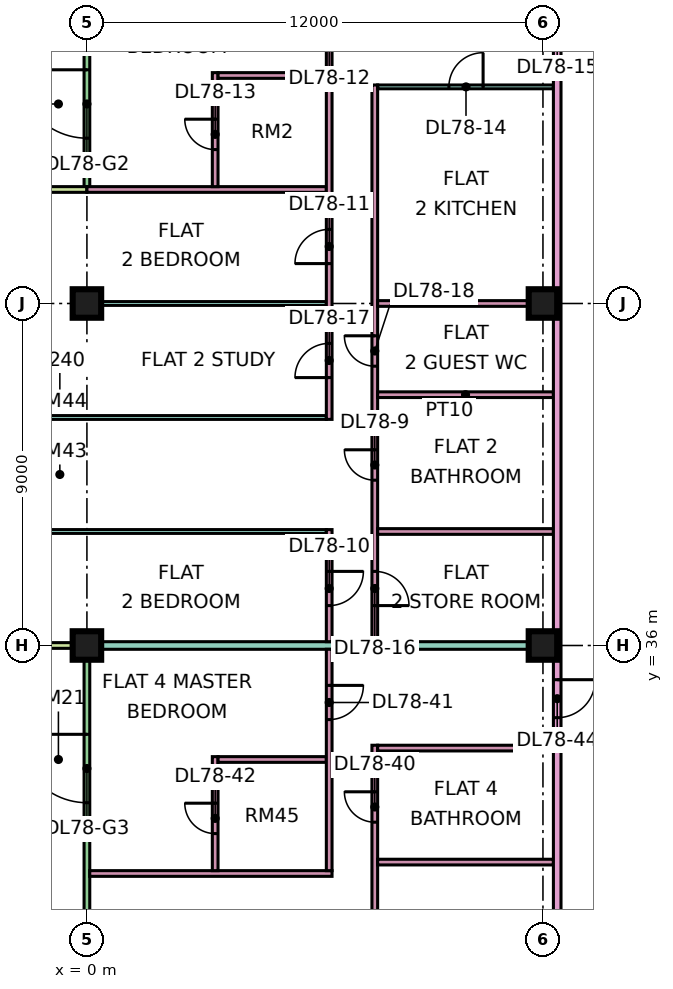
"""IFC4 building model, lengths in metres.
Left out: names, types, materials, properties, quantities, classifications, styles, units other than length and angle.
Written with IfcOpenShell. Run it as: python <this file> out.ifc"""

import sys

from ifc_helpers import new_model, si_unit, direction, frame, frame_2d, origin, origin_2d, place, context, subcontext, project, spatial, rectangle, extrude, element, fill, save


model = new_model("IFC4")
c1 = context("Model", 3, precision=1e-05, world=origin(), true_north=direction((0.0, 1.0)))
c2 = subcontext(c1, "Body", "Model", "MODEL_VIEW")
j1 = project(units=[si_unit("LENGTHUNIT", "METRE"), si_unit("PLANEANGLEUNIT", "RADIAN")], contexts=[c1])
p1 = place(None, origin())
s1 = spatial("IfcSite", under=j1, at=p1, CompositionType="ELEMENT")
p2 = place(p1, origin())
s2 = spatial("IfcBuilding", under=s1, at=p2, CompositionType="ELEMENT")
p3 = place(p2, frame((0.0, 0.0, 338.9)))
s3 = spatial("IfcBuildingStorey", under=s2, at=p3, CompositionType="ELEMENT", Elevation=338.9)
p4 = place(p3, frame((0.0, 36.0, 0.0), z_axis=(0.0, 0.0, 1.0), x_axis=(1.0, 0.0, 0.0)))
e1 = element("IfcColumn", 1, at=p4, inside=s3, PredefinedType="COLUMN", context=c2, shape_type="SweptSolid", body=[
    extrude(rectangle(XDim=0.75, YDim=0.75, at=origin_2d()), origin(), (0.0, 0.0, 1.0), 3.75),
])
p5 = place(p3, frame((0.0, 45.0, 0.0), z_axis=(0.0, 0.0, 1.0), x_axis=(1.0, 0.0, 0.0)))
e2 = element("IfcColumn", 2, at=p5, inside=s3, PredefinedType="COLUMN", context=c2, shape_type="SweptSolid", body=[
    extrude(rectangle(XDim=0.75, YDim=0.75, at=origin_2d()), origin(), (0.0, 0.0, 1.0), 3.75),
])
for number, where, z_axis, x_axis in (
    (3, (12.0, 36.0, 0.0), (0.0, 0.0, 1.0), (1.0, 0.0, 0.0)),
    (4, (12.0, 45.0, 0.0), (0.0, 0.0, 1.0), (1.0, 0.0, 0.0)),
):
    element("IfcColumn", number, at=place(p3, frame(where, z_axis=z_axis, x_axis=x_axis)), inside=s3, PredefinedType="COLUMN", context=c2, shape_type="SweptSolid", body=[
        extrude(rectangle(XDim=0.75, YDim=0.75, at=origin_2d()), origin(), (0.0, 0.0, 1.0), 3.75),
    ])
p6 = place(p3, frame((0.0, 52.425, 0.0), z_axis=(0.0, 0.0, 1.0), x_axis=(0.0, -1.0, 0.0)))
e5 = element("IfcWall", 5, at=p6, inside=s3, PredefinedType="SOLIDWALL", context=c2, shape_type="SweptSolid", body=[
    extrude(rectangle(XDim=4.35, YDim=0.15, at=frame_2d((2.175, 0.0))), origin(), (0.0, 0.0, 1.0), 3.35),
])
p7 = place(p6, frame((1.275, 0.0, 0.0)))
e6 = element("IfcOpeningElement", 6, at=p7, cuts=e5, PredefinedType="OPENING", context=c2, shape_type="SweptSolid", body=[
    extrude(rectangle(XDim=1.8, YDim=2.4, at=frame_2d((0.9, 1.2))), frame((0.0, 0.085, 0.0), z_axis=(0.0, -1.0, 0.0), x_axis=(1.0, 0.0, 0.0)), (0.0, 0.0, 1.0), 0.17),
])
p8 = place(p3, frame((-1.5, 48.0, 0.0), z_axis=(0.0, 0.0, 1.0), x_axis=(1.0, 0.0, 0.0)))
e7 = element("IfcWall", 7, at=p8, inside=s3, PredefinedType="SOLIDWALL", context=c2, shape_type="SweptSolid", body=[
    extrude(rectangle(XDim=1.5, YDim=0.15, at=frame_2d((0.75, 0.0))), origin(), (0.0, 0.0, 1.0), 3.35),
])
p9 = place(p3, frame((0.0, 35.925, 0.0), z_axis=(0.0, 0.0, 1.0), x_axis=(0.0, -1.0, 0.0)))
e8 = element("IfcWall", 8, at=p9, inside=s3, PredefinedType="SOLIDWALL", context=c2, shape_type="SweptSolid", body=[
    extrude(rectangle(XDim=11.85, YDim=0.15, at=frame_2d((5.925, 0.0))), origin(), (0.0, 0.0, 1.0), 3.35),
])
p10 = place(p9, frame((2.262, 0.0, 0.0)))
e9 = element("IfcOpeningElement", 9, at=p10, cuts=e8, PredefinedType="OPENING", context=c2, shape_type="SweptSolid", body=[
    extrude(rectangle(XDim=1.8, YDim=2.4, at=frame_2d((0.9, 1.2))), frame((0.0, 0.085, 0.0), z_axis=(0.0, -1.0, 0.0), x_axis=(1.0, 0.0, 0.0)), (0.0, 0.0, 1.0), 0.17),
])
p11 = place(p9, frame((7.188, 0.0, 0.45)))
e10 = element("IfcOpeningElement", 10, at=p11, cuts=e8, PredefinedType="OPENING", context=c2, shape_type="SweptSolid", body=[
    extrude(rectangle(XDim=3.0, YDim=2.4, at=frame_2d((1.5, 1.2))), frame((0.0, 0.085, 0.0), z_axis=(0.0, -1.0, 0.0), x_axis=(1.0, 0.0, 0.0)), (0.0, 0.0, 1.0), 0.17),
])
p12 = place(p3, frame((-1.5, 36.0, 0.0), z_axis=(0.0, 0.0, 1.0), x_axis=(1.0, 0.0, 0.0)))
e11 = element("IfcWall", 11, at=p12, inside=s3, PredefinedType="SOLIDWALL", context=c2, shape_type="SweptSolid", body=[
    extrude(rectangle(XDim=1.5, YDim=0.15, at=frame_2d((0.75, 0.0))), origin(), (0.0, 0.0, 1.0), 3.35),
])
e12 = element("IfcWall", 12, at=p4, inside=s3, PredefinedType="PARTITIONING", context=c2, shape_type="SweptSolid", body=[
    extrude(rectangle(XDim=12.275, YDim=0.2, at=frame_2d((6.137, 0.0))), origin(), (0.0, 0.0, 1.0), 3.35),
])
for number, where, z_axis, x_axis in (
    (13, (-1.35, 39.0, 0.0), (0.0, 0.0, 1.0), (1.0, 0.0, 0.0)),
    (14, (-1.35, 42.0, 0.0), (0.0, 0.0, 1.0), (1.0, 0.0, 0.0)),
):
    element("IfcWall", number, at=place(p3, frame(where, z_axis=z_axis, x_axis=x_axis)), inside=s3, PredefinedType="PARTITIONING", context=c2, shape_type="SweptSolid", body=[
        extrude(rectangle(XDim=7.65, YDim=0.1, at=frame_2d((3.825, 0.0))), origin(), (0.0, 0.0, 1.0), 3.35),
    ])
e15 = element("IfcWall", 15, at=p5, inside=s3, PredefinedType="PARTITIONING", context=c2, shape_type="SweptSolid", body=[
    extrude(rectangle(XDim=6.3, YDim=0.1, at=frame_2d((3.15, 0.0))), origin(), (0.0, 0.0, 1.0), 3.35),
])
p13 = place(p3, frame((0.0, 48.0, 0.0), z_axis=(0.0, 0.0, 1.0), x_axis=(1.0, 0.0, 0.0)))
e16 = element("IfcWall", 16, at=p13, inside=s3, PredefinedType="PARTITIONING", context=c2, shape_type="SweptSolid", body=[
    extrude(rectangle(XDim=6.3, YDim=0.15, at=frame_2d((3.15, 0.0))), origin(), (0.0, 0.0, 1.0), 3.35),
])
p14 = place(p3, frame((0.074, 30.0, 0.0), z_axis=(0.0, 0.0, 1.0), x_axis=(1.0, 0.0, 0.0)))
e17 = element("IfcWall", 17, at=p14, inside=s3, PredefinedType="PARTITIONING", context=c2, shape_type="SweptSolid", body=[
    extrude(rectangle(XDim=6.376, YDim=0.15, at=frame_2d((3.188, 0.0))), origin(), (0.0, 0.0, 1.0), 3.35),
])
p15 = place(p3, frame((3.375, 30.075, 0.0), z_axis=(0.0, 0.0, 1.0), x_axis=(0.0, 1.0, 0.0)))
e18 = element("IfcWall", 18, at=p15, inside=s3, PredefinedType="PARTITIONING", context=c2, shape_type="SweptSolid", body=[
    extrude(rectangle(XDim=3.0, YDim=0.15, at=frame_2d((1.5, 0.0))), origin(), (0.0, 0.0, 1.0), 3.35),
])
p16 = place(p15, frame((0.975, 0.0, 0.0)))
e19 = element("IfcOpeningElement", 19, at=p16, cuts=e18, PredefinedType="OPENING", context=c2, shape_type="SweptSolid", body=[
    extrude(rectangle(XDim=0.8, YDim=2.1, at=frame_2d((0.4, 1.05))), frame((0.0, 0.085, 0.0), z_axis=(0.0, -1.0, 0.0), x_axis=(1.0, 0.0, 0.0)), (0.0, 0.0, 1.0), 0.17),
])
p17 = place(p3, frame((3.375, 48.075, 0.0), z_axis=(0.0, 0.0, 1.0), x_axis=(0.0, 1.0, 0.0)))
e20 = element("IfcWall", 20, at=p17, inside=s3, PredefinedType="PARTITIONING", context=c2, shape_type="SweptSolid", body=[
    extrude(rectangle(XDim=3.0, YDim=0.15, at=frame_2d((1.5, 0.0))), origin(), (0.0, 0.0, 1.0), 3.35),
])
p18 = place(p17, frame((0.975, 0.0, 0.0)))
e21 = element("IfcOpeningElement", 21, at=p18, cuts=e20, PredefinedType="OPENING", context=c2, shape_type="SweptSolid", body=[
    extrude(rectangle(XDim=0.8, YDim=2.1, at=frame_2d((0.4, 1.05))), frame((0.0, 0.085, 0.0), z_axis=(0.0, -1.0, 0.0), x_axis=(1.0, 0.0, 0.0)), (0.0, 0.0, 1.0), 0.17),
])
for number, where, z_axis, x_axis in (
    (22, (3.45, 33.0, 0.0), (0.0, 0.0, 1.0), (1.0, 0.0, 0.0)),
    (23, (3.45, 51.0, 0.0), (0.0, 0.0, 1.0), (1.0, 0.0, 0.0)),
):
    element("IfcWall", number, at=place(p3, frame(where, z_axis=z_axis, x_axis=x_axis)), inside=s3, PredefinedType="PARTITIONING", context=c2, shape_type="SweptSolid", body=[
        extrude(rectangle(XDim=2.85, YDim=0.15, at=frame_2d((1.425, 0.0))), origin(), (0.0, 0.0, 1.0), 3.35),
    ])
p19 = place(p3, frame((6.375, 30.075, 0.0), z_axis=(0.0, 0.0, 1.0), x_axis=(0.0, 1.0, 0.0)))
e24 = element("IfcWall", 24, at=p19, inside=s3, PredefinedType="PARTITIONING", context=c2, shape_type="SweptSolid", body=[
    extrude(rectangle(XDim=5.825, YDim=0.15, at=frame_2d((2.913, 0.0))), origin(), (0.0, 0.0, 1.0), 3.35),
])
p20 = place(p19, frame((3.975, 0.0, 0.0)))
e25 = element("IfcOpeningElement", 25, at=p20, cuts=e24, PredefinedType="OPENING", context=c2, shape_type="SweptSolid", body=[
    extrude(rectangle(XDim=0.9, YDim=2.1, at=frame_2d((0.45, 1.05))), frame((0.0, 0.085, 0.0), z_axis=(0.0, -1.0, 0.0), x_axis=(1.0, 0.0, 0.0)), (0.0, 0.0, 1.0), 0.17),
])
p21 = place(p3, frame((6.375, 36.1, 0.0), z_axis=(0.0, 0.0, 1.0), x_axis=(0.0, 1.0, 0.0)))
e26 = element("IfcWall", 26, at=p21, inside=s3, PredefinedType="PARTITIONING", context=c2, shape_type="SweptSolid", body=[
    extrude(rectangle(XDim=2.95, YDim=0.15, at=frame_2d((1.475, 0.0))), origin(), (0.0, 0.0, 1.0), 3.35),
])
p22 = place(p21, frame((0.95, 0.0, 0.0)))
e27 = element("IfcOpeningElement", 27, at=p22, cuts=e26, PredefinedType="OPENING", context=c2, shape_type="SweptSolid", body=[
    extrude(rectangle(XDim=0.9, YDim=2.1, at=frame_2d((0.45, 1.05))), frame((0.0, 0.085, 0.0), z_axis=(0.0, -1.0, 0.0), x_axis=(1.0, 0.0, 0.0)), (0.0, 0.0, 1.0), 0.17),
])
p23 = place(p3, frame((6.375, 41.95, 0.0), z_axis=(0.0, 0.0, 1.0), x_axis=(0.0, 1.0, 0.0)))
e28 = element("IfcWall", 28, at=p23, inside=s3, PredefinedType="PARTITIONING", context=c2, shape_type="SweptSolid", body=[
    extrude(rectangle(XDim=11.976, YDim=0.15, at=frame_2d((5.988, 0.0))), origin(), (0.0, 0.0, 1.0), 3.35),
])
p24 = place(p23, frame((4.1, 0.0, 0.0)))
e29 = element("IfcOpeningElement", 29, at=p24, cuts=e28, PredefinedType="OPENING", context=c2, shape_type="SweptSolid", body=[
    extrude(rectangle(XDim=0.9, YDim=2.1, at=frame_2d((0.45, 1.05))), frame((0.0, 0.085, 0.0), z_axis=(0.0, -1.0, 0.0), x_axis=(1.0, 0.0, 0.0)), (0.0, 0.0, 1.0), 0.17),
])
p25 = place(p23, frame((10.1, 0.0, 0.0)))
e30 = element("IfcOpeningElement", 30, at=p25, cuts=e28, PredefinedType="OPENING", context=c2, shape_type="SweptSolid", body=[
    extrude(rectangle(XDim=0.9, YDim=2.1, at=frame_2d((0.45, 1.05))), frame((0.0, 0.085, 0.0), z_axis=(0.0, -1.0, 0.0), x_axis=(1.0, 0.0, 0.0)), (0.0, 0.0, 1.0), 0.17),
])
p26 = place(p23, frame((1.1, 0.0, 0.0)))
e31 = element("IfcOpeningElement", 31, at=p26, cuts=e28, PredefinedType="OPENING", context=c2, shape_type="SweptSolid", body=[
    extrude(rectangle(XDim=0.9, YDim=2.1, at=frame_2d((0.45, 1.05))), frame((0.0, 0.085, 0.0), z_axis=(0.0, -1.0, 0.0), x_axis=(1.0, 0.0, 0.0)), (0.0, 0.0, 1.0), 0.17),
])
p27 = place(p3, frame((7.575, 22.5, 0.0), z_axis=(0.0, 0.0, 1.0), x_axis=(0.0, 1.0, 0.0)))
e32 = element("IfcWall", 32, at=p27, inside=s3, PredefinedType="PARTITIONING", context=c2, shape_type="SweptSolid", body=[
    extrude(rectangle(XDim=10.875, YDim=0.15, at=frame_2d((5.438, 0.0))), origin(), (0.0, 0.0, 1.0), 3.35),
])
p28 = place(p27, frame((8.85, 0.0, 0.0)))
e33 = element("IfcOpeningElement", 33, at=p28, cuts=e32, PredefinedType="OPENING", context=c2, shape_type="SweptSolid", body=[
    extrude(rectangle(XDim=0.8, YDim=2.1, at=frame_2d((0.4, 1.05))), frame((0.0, 0.085, 0.0), z_axis=(0.0, -1.0, 0.0), x_axis=(1.0, 0.0, 0.0)), (0.0, 0.0, 1.0), 0.17),
])
p29 = place(p27, frame((3.35, 0.0, 0.0)))
e34 = element("IfcOpeningElement", 34, at=p29, cuts=e32, PredefinedType="OPENING", context=c2, shape_type="SweptSolid", body=[
    extrude(rectangle(XDim=0.9, YDim=2.1, at=frame_2d((0.45, 1.05))), frame((0.0, 0.085, 0.0), z_axis=(0.0, -1.0, 0.0), x_axis=(1.0, 0.0, 0.0)), (0.0, 0.0, 1.0), 0.17),
])
p30 = place(p3, frame((7.575, 36.1, 0.0), z_axis=(0.0, 0.0, 1.0), x_axis=(0.0, 1.0, 0.0)))
e35 = element("IfcWall", 35, at=p30, inside=s3, PredefinedType="PARTITIONING", context=c2, shape_type="SweptSolid", body=[
    extrude(rectangle(XDim=14.65, YDim=0.15, at=frame_2d((7.325, 0.0))), origin(), (0.0, 0.0, 1.0), 3.35),
])
p31 = place(p30, frame((4.25, 0.0, 0.0)))
e36 = element("IfcOpeningElement", 36, at=p31, cuts=e35, PredefinedType="OPENING", context=c2, shape_type="SweptSolid", body=[
    extrude(rectangle(XDim=0.8, YDim=2.1, at=frame_2d((0.4, 1.05))), frame((0.0, 0.085, 0.0), z_axis=(0.0, -1.0, 0.0), x_axis=(1.0, 0.0, 0.0)), (0.0, 0.0, 1.0), 0.17),
])
p32 = place(p30, frame((0.95, 0.0, 0.0)))
e37 = element("IfcOpeningElement", 37, at=p32, cuts=e35, PredefinedType="OPENING", context=c2, shape_type="SweptSolid", body=[
    extrude(rectangle(XDim=0.9, YDim=2.1, at=frame_2d((0.45, 1.05))), frame((0.0, 0.085, 0.0), z_axis=(0.0, -1.0, 0.0), x_axis=(1.0, 0.0, 0.0)), (0.0, 0.0, 1.0), 0.17),
])
p33 = place(p30, frame((7.25, 0.0, 0.0)))
e38 = element("IfcOpeningElement", 38, at=p33, cuts=e35, PredefinedType="OPENING", context=c2, shape_type="SweptSolid", body=[
    extrude(rectangle(XDim=0.8, YDim=2.1, at=frame_2d((0.4, 1.05))), frame((0.0, 0.085, 0.0), z_axis=(0.0, -1.0, 0.0), x_axis=(1.0, 0.0, 0.0)), (0.0, 0.0, 1.0), 0.17),
])
for number, where, z_axis, x_axis in (
    (39, (7.65, 30.3, 0.0), (0.0, 0.0, 1.0), (1.0, 0.0, 0.0)),
    (40, (7.65, 33.3, 0.0), (0.0, 0.0, 1.0), (1.0, 0.0, 0.0)),
    (41, (7.65, 39.0, 0.0), (0.0, 0.0, 1.0), (1.0, 0.0, 0.0)),
    (42, (7.65, 42.6, 0.0), (0.0, 0.0, 1.0), (1.0, 0.0, 0.0)),
    (43, (7.65, 45.0, 0.0), (0.0, 0.0, 1.0), (1.0, 0.0, 0.0)),
):
    element("IfcWall", number, at=place(p3, frame(where, z_axis=z_axis, x_axis=x_axis)), inside=s3, PredefinedType="PARTITIONING", context=c2, shape_type="SweptSolid", body=[
        extrude(rectangle(XDim=4.625, YDim=0.15, at=frame_2d((2.312, 0.0))), origin(), (0.0, 0.0, 1.0), 3.35),
    ])
p34 = place(p3, frame((7.65, 50.7, 0.0), z_axis=(0.0, 0.0, 1.0), x_axis=(1.0, 0.0, 0.0)))
e44 = element("IfcWall", 44, at=p34, inside=s3, PredefinedType="PARTITIONING", context=c2, shape_type="SweptSolid", body=[
    extrude(rectangle(XDim=4.625, YDim=0.1, at=frame_2d((2.312, 0.0))), origin(), (0.0, 0.0, 1.0), 3.35),
])
p35 = place(p34, frame((1.875, 0.0, 0.0)))
e45 = element("IfcOpeningElement", 45, at=p35, cuts=e44, PredefinedType="OPENING", context=c2, shape_type="SweptSolid", body=[
    extrude(rectangle(XDim=0.9, YDim=2.1, at=frame_2d((0.45, 1.05))), frame((0.0, 0.06, 0.0), z_axis=(0.0, -1.0, 0.0), x_axis=(1.0, 0.0, 0.0)), (0.0, 0.0, 1.0), 0.12),
])
p36 = place(p3, frame((12.375, 20.0, 0.0), z_axis=(0.0, 0.0, 1.0), x_axis=(0.0, 1.0, 0.0)))
e46 = element("IfcWall", 46, at=p36, inside=s3, PredefinedType="PARTITIONING", context=c2, shape_type="SweptSolid", body=[
    extrude(rectangle(XDim=34.0, YDim=0.2, at=frame_2d((17.0, 0.0))), origin(), (0.0, 0.0, 1.0), 3.35),
])
p37 = place(p36, frame((31.8, 0.0, 0.0)))
e47 = element("IfcOpeningElement", 47, at=p37, cuts=e46, PredefinedType="OPENING", context=c2, shape_type="SweptSolid", body=[
    extrude(rectangle(XDim=1.0, YDim=2.1, at=frame_2d((0.5, 1.05))), frame((0.0, 0.11, 0.0), z_axis=(0.0, -1.0, 0.0), x_axis=(1.0, 0.0, 0.0)), (0.0, 0.0, 1.0), 0.22),
])
p38 = place(p36, frame((0.6, 0.0, 0.0)))
e48 = element("IfcOpeningElement", 48, at=p38, cuts=e46, PredefinedType="OPENING", context=c2, shape_type="SweptSolid", body=[
    extrude(rectangle(XDim=1.2, YDim=2.1, at=frame_2d((0.6, 1.05))), frame((0.0, 0.11, 0.0), z_axis=(0.0, -1.0, 0.0), x_axis=(1.0, 0.0, 0.0)), (0.0, 0.0, 1.0), 0.22),
])
p39 = place(p36, frame((14.1, 0.0, 0.0)))
e49 = element("IfcOpeningElement", 49, at=p39, cuts=e46, PredefinedType="OPENING", context=c2, shape_type="SweptSolid", body=[
    extrude(rectangle(XDim=1.0, YDim=2.1, at=frame_2d((0.5, 1.05))), frame((0.0, 0.11, 0.0), z_axis=(0.0, -1.0, 0.0), x_axis=(1.0, 0.0, 0.0)), (0.0, 0.0, 1.0), 0.22),
])
p40 = place(p7, frame((1.8, 0.0, 0.0), z_axis=(0.0, 0.0, 1.0), x_axis=(-1.0, 0.0, 0.0)))
e50 = element("IfcDoor", 50, at=p40, inside=s3, OperationType="DOUBLE_DOOR_SINGLE_SWING", PredefinedType="DOOR", context=c2, shape_type="SweptSolid", body=[
    extrude(rectangle(XDim=1.8, YDim=2.4, at=frame_2d((0.9, 1.2))), frame((0.0, 0.025, 0.0), z_axis=(0.0, -1.0, 0.0), x_axis=(1.0, 0.0, 0.0)), (0.0, 0.0, 1.0), 0.05),
])
fill(e6, e50)
p41 = place(p10, frame((1.8, 0.0, 0.0), z_axis=(0.0, 0.0, 1.0), x_axis=(-1.0, 0.0, 0.0)))
e51 = element("IfcDoor", 51, at=p41, inside=s3, OperationType="DOUBLE_DOOR_SINGLE_SWING", PredefinedType="DOOR", context=c2, shape_type="SweptSolid", body=[
    extrude(rectangle(XDim=1.8, YDim=2.4, at=frame_2d((0.9, 1.2))), frame((0.0, 0.025, 0.0), z_axis=(0.0, -1.0, 0.0), x_axis=(1.0, 0.0, 0.0)), (0.0, 0.0, 1.0), 0.05),
])
fill(e9, e51)
p42 = place(p31, frame((0.8, 0.0, 0.0), z_axis=(0.0, 0.0, 1.0), x_axis=(-1.0, 0.0, 0.0)))
e52 = element("IfcDoor", 52, at=p42, inside=s3, OperationType="SINGLE_SWING_RIGHT", PredefinedType="DOOR", context=c2, shape_type="SweptSolid", body=[
    extrude(rectangle(XDim=0.8, YDim=2.1, at=frame_2d((0.4, 1.05))), frame((0.0, 0.025, 0.0), z_axis=(0.0, -1.0, 0.0), x_axis=(1.0, 0.0, 0.0)), (0.0, 0.0, 1.0), 0.05),
])
fill(e36, e52)
p43 = place(p22, origin())
e53 = element("IfcDoor", 53, at=p43, inside=s3, OperationType="SINGLE_SWING_RIGHT", PredefinedType="DOOR", context=c2, shape_type="SweptSolid", body=[
    extrude(rectangle(XDim=0.9, YDim=2.1, at=frame_2d((0.45, 1.05))), frame((0.0, 0.025, 0.0), z_axis=(0.0, -1.0, 0.0), x_axis=(1.0, 0.0, 0.0)), (0.0, 0.0, 1.0), 0.05),
])
fill(e27, e53)
p44 = place(p24, origin())
e54 = element("IfcDoor", 54, at=p44, inside=s3, OperationType="SINGLE_SWING_LEFT", PredefinedType="DOOR", context=c2, shape_type="SweptSolid", body=[
    extrude(rectangle(XDim=0.9, YDim=2.1, at=frame_2d((0.45, 1.05))), frame((0.0, 0.025, 0.0), z_axis=(0.0, -1.0, 0.0), x_axis=(1.0, 0.0, 0.0)), (0.0, 0.0, 1.0), 0.05),
])
fill(e29, e54)
p45 = place(p18, frame((0.8, 0.0, 0.0), z_axis=(0.0, 0.0, 1.0), x_axis=(-1.0, 0.0, 0.0)))
e55 = element("IfcDoor", 55, at=p45, inside=s3, OperationType="SINGLE_SWING_RIGHT", PredefinedType="DOOR", context=c2, shape_type="SweptSolid", body=[
    extrude(rectangle(XDim=0.8, YDim=2.1, at=frame_2d((0.4, 1.05))), frame((0.0, 0.025, 0.0), z_axis=(0.0, -1.0, 0.0), x_axis=(1.0, 0.0, 0.0)), (0.0, 0.0, 1.0), 0.05),
])
fill(e21, e55)
p46 = place(p35, frame((0.9, 0.0, 0.0), z_axis=(0.0, 0.0, 1.0), x_axis=(-1.0, 0.0, 0.0)))
e56 = element("IfcDoor", 56, at=p46, inside=s3, OperationType="SINGLE_SWING_RIGHT", PredefinedType="DOOR", context=c2, shape_type="SweptSolid", body=[
    extrude(rectangle(XDim=0.9, YDim=2.1, at=frame_2d((0.45, 1.05))), frame((0.0, 0.025, 0.0), z_axis=(0.0, -1.0, 0.0), x_axis=(1.0, 0.0, 0.0)), (0.0, 0.0, 1.0), 0.05),
])
fill(e45, e56)
p47 = place(p32, frame((0.9, 0.0, 0.0), z_axis=(0.0, 0.0, 1.0), x_axis=(-1.0, 0.0, 0.0)))
e57 = element("IfcDoor", 57, at=p47, inside=s3, OperationType="SINGLE_SWING_LEFT", PredefinedType="DOOR", context=c2, shape_type="SweptSolid", body=[
    extrude(rectangle(XDim=0.9, YDim=2.1, at=frame_2d((0.45, 1.05))), frame((0.0, 0.025, 0.0), z_axis=(0.0, -1.0, 0.0), x_axis=(1.0, 0.0, 0.0)), (0.0, 0.0, 1.0), 0.05),
])
fill(e37, e57)
p48 = place(p26, origin())
e58 = element("IfcDoor", 58, at=p48, inside=s3, OperationType="SINGLE_SWING_LEFT", PredefinedType="DOOR", context=c2, shape_type="SweptSolid", body=[
    extrude(rectangle(XDim=0.9, YDim=2.1, at=frame_2d((0.45, 1.05))), frame((0.0, 0.025, 0.0), z_axis=(0.0, -1.0, 0.0), x_axis=(1.0, 0.0, 0.0)), (0.0, 0.0, 1.0), 0.05),
])
fill(e31, e58)
p49 = place(p33, frame((0.8, 0.0, 0.0), z_axis=(0.0, 0.0, 1.0), x_axis=(-1.0, 0.0, 0.0)))
e59 = element("IfcDoor", 59, at=p49, inside=s3, OperationType="SINGLE_SWING_RIGHT", PredefinedType="DOOR", context=c2, shape_type="SweptSolid", body=[
    extrude(rectangle(XDim=0.8, YDim=2.1, at=frame_2d((0.4, 1.05))), frame((0.0, 0.025, 0.0), z_axis=(0.0, -1.0, 0.0), x_axis=(1.0, 0.0, 0.0)), (0.0, 0.0, 1.0), 0.05),
])
fill(e38, e59)
p50 = place(p28, frame((0.8, 0.0, 0.0), z_axis=(0.0, 0.0, 1.0), x_axis=(-1.0, 0.0, 0.0)))
e60 = element("IfcDoor", 60, at=p50, inside=s3, OperationType="SINGLE_SWING_RIGHT", PredefinedType="DOOR", context=c2, shape_type="SweptSolid", body=[
    extrude(rectangle(XDim=0.8, YDim=2.1, at=frame_2d((0.4, 1.05))), frame((0.0, 0.025, 0.0), z_axis=(0.0, -1.0, 0.0), x_axis=(1.0, 0.0, 0.0)), (0.0, 0.0, 1.0), 0.05),
])
fill(e33, e60)
p51 = place(p20, origin())
e61 = element("IfcDoor", 61, at=p51, inside=s3, OperationType="SINGLE_SWING_RIGHT", PredefinedType="DOOR", context=c2, shape_type="SweptSolid", body=[
    extrude(rectangle(XDim=0.9, YDim=2.1, at=frame_2d((0.45, 1.05))), frame((0.0, 0.025, 0.0), z_axis=(0.0, -1.0, 0.0), x_axis=(1.0, 0.0, 0.0)), (0.0, 0.0, 1.0), 0.05),
])
fill(e25, e61)
p52 = place(p16, frame((0.8, 0.0, 0.0), z_axis=(0.0, 0.0, 1.0), x_axis=(-1.0, 0.0, 0.0)))
e62 = element("IfcDoor", 62, at=p52, inside=s3, OperationType="SINGLE_SWING_RIGHT", PredefinedType="DOOR", context=c2, shape_type="SweptSolid", body=[
    extrude(rectangle(XDim=0.8, YDim=2.1, at=frame_2d((0.4, 1.05))), frame((0.0, 0.025, 0.0), z_axis=(0.0, -1.0, 0.0), x_axis=(1.0, 0.0, 0.0)), (0.0, 0.0, 1.0), 0.05),
])
fill(e19, e62)
p53 = place(p39, origin())
e63 = element("IfcDoor", 63, at=p53, inside=s3, OperationType="SINGLE_SWING_RIGHT", PredefinedType="DOOR", context=c2, shape_type="SweptSolid", body=[
    extrude(rectangle(XDim=1.0, YDim=2.1, at=frame_2d((0.5, 1.05))), frame((0.0, 0.025, 0.0), z_axis=(0.0, -1.0, 0.0), x_axis=(1.0, 0.0, 0.0)), (0.0, 0.0, 1.0), 0.05),
])
fill(e49, e63)
save(model, sys.argv[1])
